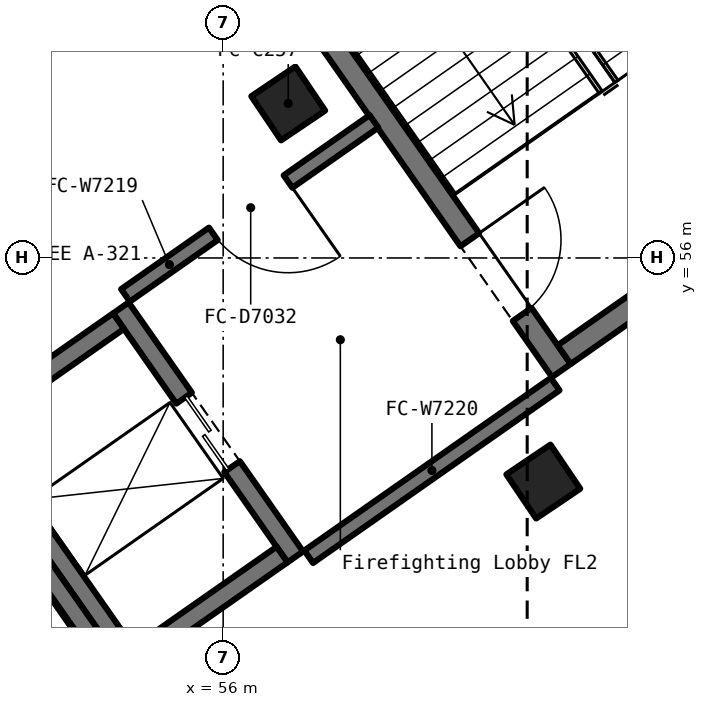
"""IFC4 building model, lengths in metres.
Left out: names, types, materials, properties, quantities, classifications, styles, units other than length and angle.
Written with IfcOpenShell. Run it as: python <this file> out.ifc"""

import sys

from ifc_helpers import new_model, si_unit, direction, frame, frame_2d, origin, origin_2d, place, context, subcontext, project, spatial, rectangle, extrude, element, fill, save


model = new_model("IFC4")
c1 = context("Model", 3, precision=1e-05, world=origin(), true_north=direction((0.0, 1.0)))
c2 = subcontext(c1, "Body", "Model", "MODEL_VIEW")
j1 = project(units=[si_unit("LENGTHUNIT", "METRE"), si_unit("PLANEANGLEUNIT", "RADIAN")], contexts=[c1])
p1 = place(None, origin())
s1 = spatial("IfcSite", under=j1, at=p1, CompositionType="ELEMENT")
p2 = place(p1, origin())
s2 = spatial("IfcBuilding", under=s1, at=p2, CompositionType="ELEMENT")
p3 = place(p2, origin())
s3 = spatial("IfcBuildingStorey", under=s2, at=p3, CompositionType="ELEMENT", Elevation=0.0)
for number, where, z_axis, x_axis in (
    (1, (60.212, 53.058, 0.0), (0.0, 0.0, 1.0), (0.829, 0.559, 0.0)),
    (2, (56.856, 58.033, 0.0), (0.0, 0.0, 1.0), (0.829, 0.559, 0.0)),
):
    element("IfcColumn", number, at=place(p3, frame(where, z_axis=z_axis, x_axis=x_axis)), inside=s3, PredefinedType="COLUMN", context=c2, shape_type="SweptSolid", body=[
        extrude(rectangle(XDim=0.7, YDim=0.7, at=origin_2d()), origin(), (0.0, 0.0, 1.0), 6.0),
    ])
p4 = place(p3, frame((64.791, 57.559, 0.0), z_axis=(0.0, 0.0, 1.0), x_axis=(-0.573514776444, 0.819195215563, 0.0)))
e3 = element("IfcWall", 3, at=p4, inside=s3, PredefinedType="SOLIDWALL", context=c2, shape_type="SweptSolid", body=[
    extrude(rectangle(XDim=10.0, YDim=0.3, at=frame_2d((5.0, 0.0))), origin(), (0.0, 0.0, 1.0), 6.0),
])
p5 = place(p3, frame((54.714, 62.711, 0.0), z_axis=(0.0, 0.0, 1.0), x_axis=(0.573563925118, -0.819160804606, 0.0)))
e4 = element("IfcWall", 4, at=p5, inside=s3, PredefinedType="SOLIDWALL", context=c2, shape_type="SweptSolid", body=[
    extrude(rectangle(XDim=10.0, YDim=0.3, at=frame_2d((5.0, 0.0))), origin(), (0.0, 0.0, 1.0), 6.0),
])
p6 = place(p5, frame((7.9, 0.0, 0.0)))
e5 = element("IfcOpeningElement", 5, at=p6, cuts=e4, PredefinedType="OPENING", context=c2, shape_type="SweptSolid", body=[
    extrude(rectangle(XDim=1.2, YDim=2.1, at=frame_2d((0.6, 1.05))), frame((0.0, 0.162, 0.0), z_axis=(0.0, -1.0, 0.0), x_axis=(1.0, 0.0, 0.0)), (0.0, 0.0, 1.0), 0.324),
])
p7 = place(p3, frame((60.487, 54.728, 0.0), z_axis=(0.0, 0.0, 1.0), x_axis=(0.819096538389, 0.573655698829, 0.0)))
e6 = element("IfcWall", 6, at=p7, inside=s3, PredefinedType="SOLIDWALL", context=c2, shape_type="SweptSolid", body=[
    extrude(rectangle(XDim=4.999, YDim=0.3, at=frame_2d((2.5, 0.0))), origin(), (0.0, 0.0, 1.0), 6.0),
])
p8 = place(p3, frame((56.949, 52.067, 0.0), z_axis=(0.0, 0.0, 1.0), x_axis=(-0.573736768582, 0.819039755065, 0.0)))
e7 = element("IfcWall", 7, at=p8, inside=s3, PredefinedType="SOLIDWALL", context=c2, shape_type="SweptSolid", body=[
    extrude(rectangle(XDim=4.0, YDim=0.25, at=frame_2d((2.0, 0.0))), origin(), (0.0, 0.0, 1.0), 6.0),
])
p9 = place(p8, frame((1.45, 0.0, 0.0)))
e8 = element("IfcOpeningElement", 8, at=p9, cuts=e7, PredefinedType="OPENING", context=c2, shape_type="SweptSolid", body=[
    extrude(rectangle(XDim=1.1, YDim=2.1, at=frame_2d((0.55, 1.05))), frame((0.0, 0.137, 0.0), z_axis=(0.0, -1.0, 0.0), x_axis=(1.0, 0.0, 0.0)), (0.0, 0.0, 1.0), 0.274),
])
p10 = place(p3, frame((54.623, 55.169, 0.0), z_axis=(0.0, 0.0, 1.0), x_axis=(-0.819226933165, -0.573469469089, 0.0)))
e9 = element("IfcWall", 9, at=p10, inside=s3, PredefinedType="SOLIDWALL", context=c2, shape_type="SweptSolid", body=[
    extrude(rectangle(XDim=2.3, YDim=0.25, at=frame_2d((1.15, 0.0))), origin(), (0.0, 0.0, 1.0), 6.0),
])
p11 = place(p3, frame((52.565, 53.881, 0.0), z_axis=(0.0, 0.0, 1.0), x_axis=(0.573572956461, -0.819154480923, 0.0)))
e10 = element("IfcWall", 10, at=p11, inside=s3, PredefinedType="SOLIDWALL", context=c2, shape_type="SweptSolid", body=[
    extrude(rectangle(XDim=4.0, YDim=0.25, at=frame_2d((2.0, 0.0))), origin(), (0.0, 0.0, 1.0), 6.0),
])
p12 = place(p3, frame((54.89, 50.779, 0.0), z_axis=(0.0, 0.0, 1.0), x_axis=(0.819366508838, 0.573270027295, 0.0)))
e11 = element("IfcWall", 11, at=p12, inside=s3, PredefinedType="SOLIDWALL", context=c2, shape_type="SweptSolid", body=[
    extrude(rectangle(XDim=2.301, YDim=0.25, at=frame_2d((1.15, 0.0))), origin(), (0.0, 0.0, 1.0), 6.0),
])
p13 = place(p3, frame((54.655, 50.461, 0.0), z_axis=(0.0, 0.0, 1.0), x_axis=(-0.573572956461, 0.819154480923, 0.0)))
e12 = element("IfcWall", 12, at=p13, inside=s3, PredefinedType="SOLIDWALL", context=c2, shape_type="SweptSolid", body=[
    extrude(rectangle(XDim=4.0, YDim=0.25, at=frame_2d((2.0, 0.0))), origin(), (0.0, 0.0, 1.0), 6.0),
])
p14 = place(p3, frame((57.984, 57.797, 0.0), z_axis=(0.0, 0.0, 1.0), x_axis=(-0.819125561737, -0.573614255497, 0.0)))
e13 = element("IfcWall", 13, at=p14, inside=s3, PredefinedType="PARTITIONING", context=c2, shape_type="SweptSolid", body=[
    extrude(rectangle(XDim=3.99, YDim=0.2, at=frame_2d((1.995, 0.0))), origin(), (0.0, 0.0, 1.0), 5.78),
])
p15 = place(p14, frame((1.38, 0.0, 0.0)))
e14 = element("IfcOpeningElement", 14, at=p15, cuts=e13, PredefinedType="OPENING", context=c2, shape_type="SweptSolid", body=[
    extrude(rectangle(XDim=1.2, YDim=2.1, at=frame_2d((0.6, 1.05))), frame((0.0, 0.112, 0.0), z_axis=(0.0, -1.0, 0.0), x_axis=(1.0, 0.0, 0.0)), (0.0, 0.0, 1.0), 0.224),
])
p16 = place(p3, frame((57.125, 52.069, 0.0), z_axis=(0.0, 0.0, 1.0), x_axis=(0.81911891796, 0.573623742744, 0.0)))
e15 = element("IfcWall", 15, at=p16, inside=s3, PredefinedType="PARTITIONING", context=c2, shape_type="SweptSolid", body=[
    extrude(rectangle(XDim=3.959, YDim=0.2, at=frame_2d((1.979, 0.0))), origin(), (0.0, 0.0, 1.0), 5.78),
])
p17 = place(p6, origin())
e16 = element("IfcDoor", 16, at=p17, inside=s3, OperationType="SINGLE_SWING_LEFT", PredefinedType="DOOR", context=c2, shape_type="SweptSolid", body=[
    extrude(rectangle(XDim=1.2, YDim=2.1, at=frame_2d((0.6, 1.05))), frame((0.0, 0.025, 0.0), z_axis=(0.0, -1.0, 0.0), x_axis=(1.0, 0.0, 0.0)), (0.0, 0.0, 1.0), 0.05),
])
fill(e5, e16)
p18 = place(p9, origin())
e17 = element("IfcDoor", 17, at=p18, inside=s3, OperationType="DOUBLE_DOOR_SLIDING", PredefinedType="DOOR", context=c2, shape_type="SweptSolid", body=[
    extrude(rectangle(XDim=1.1, YDim=2.1, at=frame_2d((0.55, 1.05))), frame((0.0, 0.025, 0.0), z_axis=(0.0, -1.0, 0.0), x_axis=(1.0, 0.0, 0.0)), (0.0, 0.0, 1.0), 0.05),
])
fill(e8, e17)
p19 = place(p15, origin())
e18 = element("IfcDoor", 18, at=p19, inside=s3, OperationType="SINGLE_SWING_LEFT", PredefinedType="DOOR", context=c2, shape_type="SweptSolid", body=[
    extrude(rectangle(XDim=1.2, YDim=2.1, at=frame_2d((0.6, 1.05))), frame((0.0, 0.025, 0.0), z_axis=(0.0, -1.0, 0.0), x_axis=(1.0, 0.0, 0.0)), (0.0, 0.0, 1.0), 0.05),
])
fill(e14, e18)
save(model, sys.argv[1])
